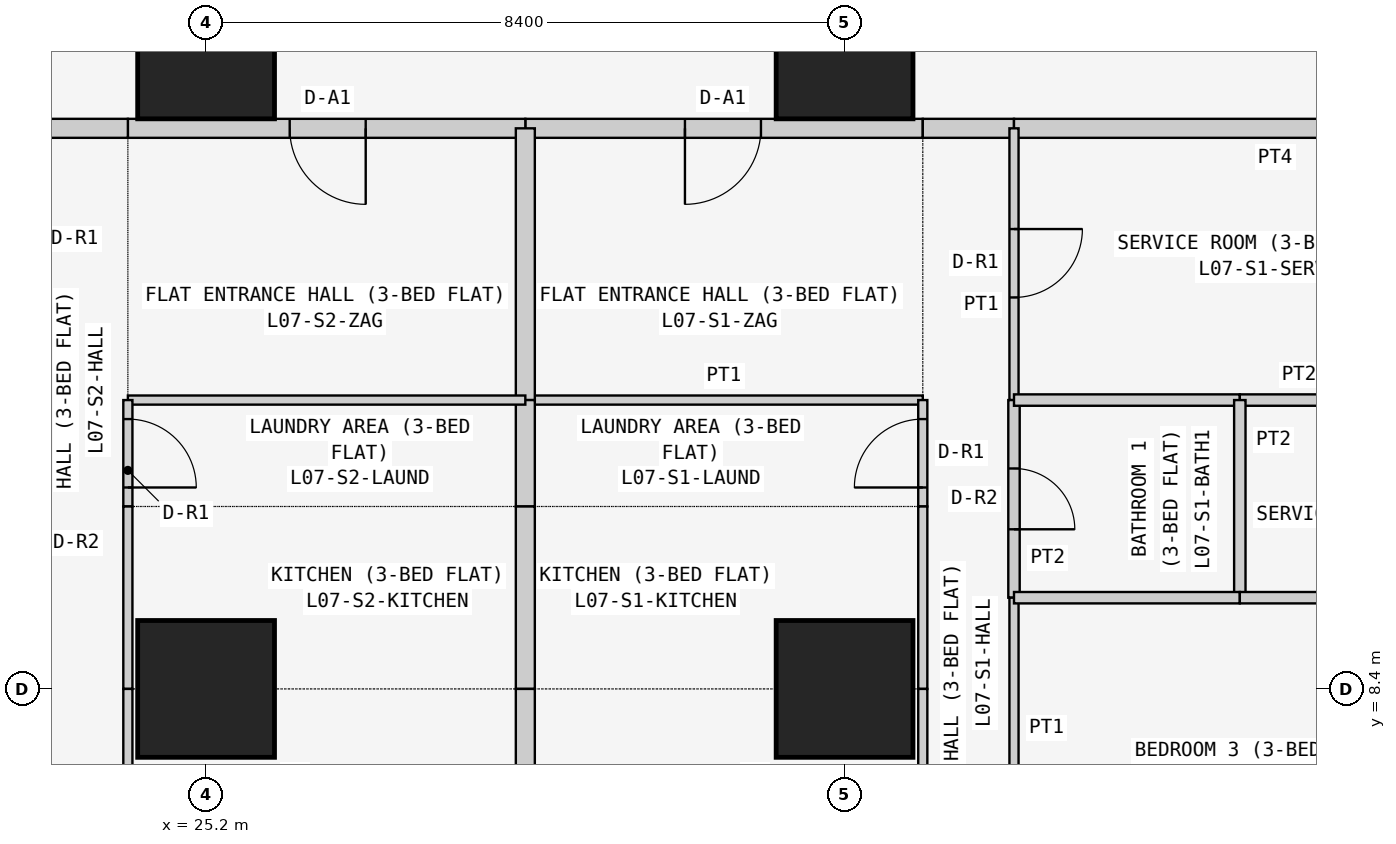
"""IFC4 building model, lengths in metres.
Left out: names, types, materials, properties, quantities, classifications, styles, units other than length and angle.
Written with IfcOpenShell. Run it as: python <this file> out.ifc"""

import sys

from ifc_helpers import new_model, si_unit, direction, frame, frame_2d, origin, origin_2d, place, context, subcontext, project, spatial, rectangle, extrude, element, fill, save


model = new_model("IFC4")
c1 = context("Model", 3, precision=1e-05, world=origin(), true_north=direction((0.0, 1.0)))
c2 = subcontext(c1, "Body", "Model", "MODEL_VIEW")
j1 = project(units=[si_unit("LENGTHUNIT", "METRE"), si_unit("PLANEANGLEUNIT", "RADIAN")], contexts=[c1])
p1 = place(None, origin())
s1 = spatial("IfcSite", under=j1, at=p1, CompositionType="ELEMENT")
p2 = place(p1, origin())
s2 = spatial("IfcBuilding", under=s1, at=p2, CompositionType="ELEMENT")
p3 = place(p2, frame((0.0, 0.0, 34.5)))
s3 = spatial("IfcBuildingStorey", under=s2, at=p3, CompositionType="ELEMENT", Elevation=34.5)
for number, where, z_axis, x_axis in (
    (1, (25.2, 8.4, 0.0), (0.0, 0.0, 1.0), (1.0, 0.0, 0.0)),
    (2, (25.2, 16.8, 0.0), (0.0, 0.0, 1.0), (1.0, 0.0, 0.0)),
    (3, (33.6, 8.4, 0.0), (0.0, 0.0, 1.0), (1.0, 0.0, 0.0)),
    (4, (33.6, 16.8, 0.0), (0.0, 0.0, 1.0), (1.0, 0.0, 0.0)),
):
    element("IfcColumn", number, at=place(p3, frame(where, z_axis=z_axis, x_axis=x_axis)), inside=s3, PredefinedType="COLUMN", context=c2, shape_type="SweptSolid", body=[
        extrude(rectangle(XDim=1.8, YDim=1.8, at=origin_2d()), origin(), (0.0, 0.0, 1.0), 3.6),
    ])
p4 = place(p3, frame((34.629, 15.775, 0.0), z_axis=(0.0, 0.0, 1.0), x_axis=(-1.0, 0.0, 0.0)))
e5 = element("IfcWall", 5, at=p4, inside=s3, PredefinedType="PARTITIONING", context=c2, shape_type="SweptSolid", body=[
    extrude(rectangle(XDim=5.229, YDim=0.25, at=frame_2d((2.615, 0.0))), origin(), (0.0, 0.0, 1.0), 3.45),
])
p5 = place(p4, frame((2.129, 0.0, 0.0)))
e6 = element("IfcOpeningElement", 6, at=p5, cuts=e5, PredefinedType="OPENING", context=c2, shape_type="SweptSolid", body=[
    extrude(rectangle(XDim=1.0, YDim=2.1, at=frame_2d((0.5, 1.05))), frame((0.0, 0.135, 0.0), z_axis=(0.0, -1.0, 0.0), x_axis=(1.0, 0.0, 0.0)), (0.0, 0.0, 1.0), 0.27),
])
p6 = place(p3, frame((35.829, 15.775, 0.0), z_axis=(0.0, 0.0, 1.0), x_axis=(-1.0, 0.0, 0.0)))
e7 = element("IfcWall", 7, at=p6, inside=s3, PredefinedType="PARTITIONING", context=c2, shape_type="SweptSolid", body=[
    extrude(rectangle(XDim=1.2, YDim=0.25, at=frame_2d((0.6, 0.0))), origin(), (0.0, 0.0, 1.0), 3.45),
])
p7 = place(p3, frame((42.7, 15.775, 0.0), z_axis=(0.0, 0.0, 1.0), x_axis=(-1.0, 0.0, 0.0)))
e8 = element("IfcWall", 8, at=p7, inside=s3, PredefinedType="PARTITIONING", context=c2, shape_type="SweptSolid", body=[
    extrude(rectangle(XDim=6.871, YDim=0.25, at=frame_2d((3.436, 0.0))), origin(), (0.0, 0.0, 1.0), 3.45),
])
p8 = place(p3, frame((29.4, 15.775, 0.0), z_axis=(0.0, 0.0, 1.0), x_axis=(-1.0, 0.0, 0.0)))
e9 = element("IfcWall", 9, at=p8, inside=s3, PredefinedType="PARTITIONING", context=c2, shape_type="SweptSolid", body=[
    extrude(rectangle(XDim=5.229, YDim=0.25, at=frame_2d((2.615, 0.0))), origin(), (0.0, 0.0, 1.0), 3.45),
])
p9 = place(p8, frame((2.1, 0.0, 0.0)))
e10 = element("IfcOpeningElement", 10, at=p9, cuts=e9, PredefinedType="OPENING", context=c2, shape_type="SweptSolid", body=[
    extrude(rectangle(XDim=1.0, YDim=2.1, at=frame_2d((0.5, 1.05))), frame((0.0, 0.135, 0.0), z_axis=(0.0, -1.0, 0.0), x_axis=(1.0, 0.0, 0.0)), (0.0, 0.0, 1.0), 0.27),
])
p10 = place(p3, frame((24.171, 15.775, 0.0), z_axis=(0.0, 0.0, 1.0), x_axis=(-1.0, 0.0, 0.0)))
e11 = element("IfcWall", 11, at=p10, inside=s3, PredefinedType="PARTITIONING", context=c2, shape_type="SweptSolid", body=[
    extrude(rectangle(XDim=1.2, YDim=0.25, at=frame_2d((0.6, 0.0))), origin(), (0.0, 0.0, 1.0), 3.45),
])
p11 = place(p3, frame((29.4, 12.2, 0.0), z_axis=(0.0, 0.0, 1.0), x_axis=(1.0, 0.0, 0.0)))
e12 = element("IfcWall", 12, at=p11, inside=s3, PredefinedType="PARTITIONING", context=c2, shape_type="SweptSolid", body=[
    extrude(rectangle(XDim=5.229, YDim=0.12, at=frame_2d((2.615, 0.0))), origin(), (0.0, 0.0, 1.0), 3.45),
])
p12 = place(p3, frame((29.4, 15.775, 0.0), z_axis=(0.0, 0.0, 1.0), x_axis=(0.0, -1.0, 0.0)))
e13 = element("IfcWall", 13, at=p12, inside=s3, PredefinedType="PARTITIONING", context=c2, shape_type="SweptSolid", body=[
    extrude(rectangle(XDim=3.575, YDim=0.25, at=frame_2d((1.788, 0.0))), origin(), (0.0, 0.0, 1.0), 2.848),
])
p13 = place(p3, frame((34.629, 10.8, 0.0), z_axis=(0.0, 0.0, 1.0), x_axis=(0.0, 1.0, 0.0)))
e14 = element("IfcWall", 14, at=p13, inside=s3, PredefinedType="PARTITIONING", context=c2, shape_type="SweptSolid", body=[
    extrude(rectangle(XDim=1.4, YDim=0.12, at=frame_2d((0.7, 0.0))), origin(), (0.0, 0.0, 1.0), 3.45),
])
p14 = place(p13, frame((0.25, 0.0, 0.0)))
e15 = element("IfcOpeningElement", 15, at=p14, cuts=e14, PredefinedType="OPENING", context=c2, shape_type="SweptSolid", body=[
    extrude(rectangle(XDim=0.9, YDim=2.1, at=frame_2d((0.45, 1.05))), frame((0.0, 0.07, 0.0), z_axis=(0.0, -1.0, 0.0), x_axis=(1.0, 0.0, 0.0)), (0.0, 0.0, 1.0), 0.14),
])
p15 = place(p3, frame((29.4, 12.2, 0.0), z_axis=(0.0, 0.0, 1.0), x_axis=(0.0, -1.0, 0.0)))
e16 = element("IfcWall", 16, at=p15, inside=s3, PredefinedType="PARTITIONING", context=c2, shape_type="SweptSolid", body=[
    extrude(rectangle(XDim=1.4, YDim=0.25, at=frame_2d((0.7, 0.0))), origin(), (0.0, 0.0, 1.0), 2.848),
])
p16 = place(p3, frame((34.629, 8.4, 0.0), z_axis=(0.0, 0.0, 1.0), x_axis=(0.0, 1.0, 0.0)))
e17 = element("IfcWall", 17, at=p16, inside=s3, PredefinedType="PARTITIONING", context=c2, shape_type="SweptSolid", body=[
    extrude(rectangle(XDim=2.4, YDim=0.12, at=frame_2d((1.2, 0.0))), origin(), (0.0, 0.0, 1.0), 3.45),
])
p17 = place(p3, frame((29.4, 10.8, 0.0), z_axis=(0.0, 0.0, 1.0), x_axis=(0.0, -1.0, 0.0)))
e18 = element("IfcWall", 18, at=p17, inside=s3, PredefinedType="PARTITIONING", context=c2, shape_type="SweptSolid", body=[
    extrude(rectangle(XDim=2.4, YDim=0.25, at=frame_2d((1.2, 0.0))), origin(), (0.0, 0.0, 1.0), 2.848),
])
p18 = place(p3, frame((34.629, 3.5, 0.0), z_axis=(0.0, 0.0, 1.0), x_axis=(0.0, 1.0, 0.0)))
e19 = element("IfcWall", 19, at=p18, inside=s3, PredefinedType="PARTITIONING", context=c2, shape_type="SweptSolid", body=[
    extrude(rectangle(XDim=4.9, YDim=0.12, at=frame_2d((2.45, 0.0))), origin(), (0.0, 0.0, 1.0), 3.45),
])
p19 = place(p18, frame((1.25, 0.0, 0.0)))
e20 = element("IfcOpeningElement", 20, at=p19, cuts=e19, PredefinedType="OPENING", context=c2, shape_type="SweptSolid", body=[
    extrude(rectangle(XDim=0.9, YDim=2.1, at=frame_2d((0.45, 1.05))), frame((0.0, 0.07, 0.0), z_axis=(0.0, -1.0, 0.0), x_axis=(1.0, 0.0, 0.0)), (0.0, 0.0, 1.0), 0.14),
])
p20 = place(p3, frame((29.4, 8.4, 0.0), z_axis=(0.0, 0.0, 1.0), x_axis=(0.0, -1.0, 0.0)))
e21 = element("IfcWall", 21, at=p20, inside=s3, PredefinedType="PARTITIONING", context=c2, shape_type="SweptSolid", body=[
    extrude(rectangle(XDim=9.05, YDim=0.25, at=frame_2d((4.525, 0.0))), origin(), (0.0, 0.0, 1.0), 2.848),
])
p21 = place(p3, frame((35.829, 12.2, 0.0), z_axis=(0.0, 0.0, 1.0), x_axis=(0.0, 1.0, 0.0)))
e22 = element("IfcWall", 22, at=p21, inside=s3, PredefinedType="PARTITIONING", context=c2, shape_type="SweptSolid", body=[
    extrude(rectangle(XDim=3.575, YDim=0.12, at=frame_2d((1.788, 0.0))), origin(), (0.0, 0.0, 1.0), 3.45),
])
p22 = place(p21, frame((1.35, 0.0, 0.0)))
e23 = element("IfcOpeningElement", 23, at=p22, cuts=e22, PredefinedType="OPENING", context=c2, shape_type="SweptSolid", body=[
    extrude(rectangle(XDim=0.9, YDim=2.1, at=frame_2d((0.45, 1.05))), frame((0.0, 0.07, 0.0), z_axis=(0.0, -1.0, 0.0), x_axis=(1.0, 0.0, 0.0)), (0.0, 0.0, 1.0), 0.14),
])
p23 = place(p3, frame((35.829, 9.6, 0.0), z_axis=(0.0, 0.0, 1.0), x_axis=(0.0, 1.0, 0.0)))
e24 = element("IfcWall", 24, at=p23, inside=s3, PredefinedType="PARTITIONING", context=c2, shape_type="SweptSolid", body=[
    extrude(rectangle(XDim=2.6, YDim=0.15, at=frame_2d((1.3, 0.0))), origin(), (0.0, 0.0, 1.0), 3.45),
])
p24 = place(p23, frame((0.9, 0.0, 0.0)))
e25 = element("IfcOpeningElement", 25, at=p24, cuts=e24, PredefinedType="OPENING", context=c2, shape_type="SweptSolid", body=[
    extrude(rectangle(XDim=0.8, YDim=2.1, at=frame_2d((0.4, 1.05))), frame((0.0, 0.085, 0.0), z_axis=(0.0, -1.0, 0.0), x_axis=(1.0, 0.0, 0.0)), (0.0, 0.0, 1.0), 0.17),
])
p25 = place(p3, frame((35.829, 4.7, 0.0), z_axis=(0.0, 0.0, 1.0), x_axis=(0.0, 1.0, 0.0)))
e26 = element("IfcWall", 26, at=p25, inside=s3, PredefinedType="PARTITIONING", context=c2, shape_type="SweptSolid", body=[
    extrude(rectangle(XDim=4.9, YDim=0.12, at=frame_2d((2.45, 0.0))), origin(), (0.0, 0.0, 1.0), 3.45),
])
p26 = place(p25, frame((1.65, 0.0, 0.0)))
e27 = element("IfcOpeningElement", 27, at=p26, cuts=e26, PredefinedType="OPENING", context=c2, shape_type="SweptSolid", body=[
    extrude(rectangle(XDim=0.9, YDim=2.1, at=frame_2d((0.45, 1.05))), frame((0.0, 0.07, 0.0), z_axis=(0.0, -1.0, 0.0), x_axis=(1.0, 0.0, 0.0)), (0.0, 0.0, 1.0), 0.14),
])
p27 = place(p3, frame((35.829, 12.2, 0.0), z_axis=(0.0, 0.0, 1.0), x_axis=(1.0, 0.0, 0.0)))
e28 = element("IfcWall", 28, at=p27, inside=s3, PredefinedType="PARTITIONING", context=c2, shape_type="SweptSolid", body=[
    extrude(rectangle(XDim=2.971, YDim=0.15, at=frame_2d((1.485, 0.0))), origin(), (0.0, 0.0, 1.0), 3.45),
])
p28 = place(p3, frame((38.8, 12.2, 0.0), z_axis=(0.0, 0.0, 1.0), x_axis=(1.0, 0.0, 0.0)))
e29 = element("IfcWall", 29, at=p28, inside=s3, PredefinedType="PARTITIONING", context=c2, shape_type="SweptSolid", body=[
    extrude(rectangle(XDim=3.9, YDim=0.15, at=frame_2d((1.95, 0.0))), origin(), (0.0, 0.0, 1.0), 3.45),
])
p29 = place(p28, frame((1.55, 0.0, 0.0)))
e30 = element("IfcOpeningElement", 30, at=p29, cuts=e29, PredefinedType="OPENING", context=c2, shape_type="SweptSolid", body=[
    extrude(rectangle(XDim=0.8, YDim=2.1, at=frame_2d((0.4, 1.05))), frame((0.0, 0.085, 0.0), z_axis=(0.0, -1.0, 0.0), x_axis=(1.0, 0.0, 0.0)), (0.0, 0.0, 1.0), 0.17),
])
p30 = place(p3, frame((38.8, 9.6, 0.0), z_axis=(0.0, 0.0, 1.0), x_axis=(0.0, 1.0, 0.0)))
e31 = element("IfcWall", 31, at=p30, inside=s3, PredefinedType="PARTITIONING", context=c2, shape_type="SweptSolid", body=[
    extrude(rectangle(XDim=2.6, YDim=0.15, at=frame_2d((1.3, 0.0))), origin(), (0.0, 0.0, 1.0), 3.45),
])
p31 = place(p3, frame((35.829, 9.6, 0.0), z_axis=(0.0, 0.0, 1.0), x_axis=(1.0, 0.0, 0.0)))
e32 = element("IfcWall", 32, at=p31, inside=s3, PredefinedType="PARTITIONING", context=c2, shape_type="SweptSolid", body=[
    extrude(rectangle(XDim=2.971, YDim=0.15, at=frame_2d((1.485, 0.0))), origin(), (0.0, 0.0, 1.0), 3.45),
])
p32 = place(p3, frame((38.8, 9.6, 0.0), z_axis=(0.0, 0.0, 1.0), x_axis=(1.0, 0.0, 0.0)))
e33 = element("IfcWall", 33, at=p32, inside=s3, PredefinedType="PARTITIONING", context=c2, shape_type="SweptSolid", body=[
    extrude(rectangle(XDim=3.9, YDim=0.15, at=frame_2d((1.95, 0.0))), origin(), (0.0, 0.0, 1.0), 3.45),
])
p33 = place(p3, frame((29.4, 12.2, 0.0), z_axis=(0.0, 0.0, 1.0), x_axis=(-1.0, 0.0, 0.0)))
e34 = element("IfcWall", 34, at=p33, inside=s3, PredefinedType="PARTITIONING", context=c2, shape_type="SweptSolid", body=[
    extrude(rectangle(XDim=5.229, YDim=0.12, at=frame_2d((2.615, 0.0))), origin(), (0.0, 0.0, 1.0), 3.45),
])
p34 = place(p3, frame((24.171, 10.8, 0.0), z_axis=(0.0, 0.0, 1.0), x_axis=(0.0, 1.0, 0.0)))
e35 = element("IfcWall", 35, at=p34, inside=s3, PredefinedType="PARTITIONING", context=c2, shape_type="SweptSolid", body=[
    extrude(rectangle(XDim=1.4, YDim=0.12, at=frame_2d((0.7, 0.0))), origin(), (0.0, 0.0, 1.0), 3.45),
])
p35 = place(p34, frame((0.25, 0.0, 0.0)))
e36 = element("IfcOpeningElement", 36, at=p35, cuts=e35, PredefinedType="OPENING", context=c2, shape_type="SweptSolid", body=[
    extrude(rectangle(XDim=0.9, YDim=2.1, at=frame_2d((0.45, 1.05))), frame((0.0, 0.07, 0.0), z_axis=(0.0, -1.0, 0.0), x_axis=(1.0, 0.0, 0.0)), (0.0, 0.0, 1.0), 0.14),
])
p36 = place(p3, frame((24.171, 8.4, 0.0), z_axis=(0.0, 0.0, 1.0), x_axis=(0.0, 1.0, 0.0)))
e37 = element("IfcWall", 37, at=p36, inside=s3, PredefinedType="PARTITIONING", context=c2, shape_type="SweptSolid", body=[
    extrude(rectangle(XDim=2.4, YDim=0.12, at=frame_2d((1.2, 0.0))), origin(), (0.0, 0.0, 1.0), 3.45),
])
p37 = place(p3, frame((24.171, 3.5, 0.0), z_axis=(0.0, 0.0, 1.0), x_axis=(0.0, 1.0, 0.0)))
e38 = element("IfcWall", 38, at=p37, inside=s3, PredefinedType="PARTITIONING", context=c2, shape_type="SweptSolid", body=[
    extrude(rectangle(XDim=4.9, YDim=0.12, at=frame_2d((2.45, 0.0))), origin(), (0.0, 0.0, 1.0), 3.45),
])
p38 = place(p37, frame((1.25, 0.0, 0.0)))
e39 = element("IfcOpeningElement", 39, at=p38, cuts=e38, PredefinedType="OPENING", context=c2, shape_type="SweptSolid", body=[
    extrude(rectangle(XDim=0.9, YDim=2.1, at=frame_2d((0.45, 1.05))), frame((0.0, 0.07, 0.0), z_axis=(0.0, -1.0, 0.0), x_axis=(1.0, 0.0, 0.0)), (0.0, 0.0, 1.0), 0.14),
])
p39 = place(p5, origin())
e40 = element("IfcDoor", 40, at=p39, inside=s3, OperationType="SINGLE_SWING_RIGHT", PredefinedType="DOOR", context=c2, shape_type="SweptSolid", body=[
    extrude(rectangle(XDim=1.0, YDim=2.1, at=frame_2d((0.5, 1.05))), frame((0.0, 0.025, 0.0), z_axis=(0.0, -1.0, 0.0), x_axis=(1.0, 0.0, 0.0)), (0.0, 0.0, 1.0), 0.05),
])
fill(e6, e40)
p40 = place(p14, origin())
e41 = element("IfcDoor", 41, at=p40, inside=s3, OperationType="SINGLE_SWING_LEFT", PredefinedType="DOOR", context=c2, shape_type="SweptSolid", body=[
    extrude(rectangle(XDim=0.9, YDim=2.1, at=frame_2d((0.45, 1.05))), frame((0.0, 0.025, 0.0), z_axis=(0.0, -1.0, 0.0), x_axis=(1.0, 0.0, 0.0)), (0.0, 0.0, 1.0), 0.05),
])
fill(e15, e41)
p41 = place(p22, frame((0.9, 0.0, 0.0), z_axis=(0.0, 0.0, 1.0), x_axis=(-1.0, 0.0, 0.0)))
e42 = element("IfcDoor", 42, at=p41, inside=s3, OperationType="SINGLE_SWING_LEFT", PredefinedType="DOOR", context=c2, shape_type="SweptSolid", body=[
    extrude(rectangle(XDim=0.9, YDim=2.1, at=frame_2d((0.45, 1.05))), frame((0.0, 0.025, 0.0), z_axis=(0.0, -1.0, 0.0), x_axis=(1.0, 0.0, 0.0)), (0.0, 0.0, 1.0), 0.05),
])
fill(e23, e42)
p42 = place(p24, frame((0.8, 0.0, 0.0), z_axis=(0.0, 0.0, 1.0), x_axis=(-1.0, 0.0, 0.0)))
e43 = element("IfcDoor", 43, at=p42, inside=s3, OperationType="SINGLE_SWING_RIGHT", PredefinedType="DOOR", context=c2, shape_type="SweptSolid", body=[
    extrude(rectangle(XDim=0.8, YDim=2.1, at=frame_2d((0.4, 1.05))), frame((0.0, 0.025, 0.0), z_axis=(0.0, -1.0, 0.0), x_axis=(1.0, 0.0, 0.0)), (0.0, 0.0, 1.0), 0.05),
])
fill(e25, e43)
p43 = place(p9, origin())
e44 = element("IfcDoor", 44, at=p43, inside=s3, OperationType="SINGLE_SWING_LEFT", PredefinedType="DOOR", context=c2, shape_type="SweptSolid", body=[
    extrude(rectangle(XDim=1.0, YDim=2.1, at=frame_2d((0.5, 1.05))), frame((0.0, 0.025, 0.0), z_axis=(0.0, -1.0, 0.0), x_axis=(1.0, 0.0, 0.0)), (0.0, 0.0, 1.0), 0.05),
])
fill(e10, e44)
p44 = place(p35, frame((0.9, 0.0, 0.0), z_axis=(0.0, 0.0, 1.0), x_axis=(-1.0, 0.0, 0.0)))
e45 = element("IfcDoor", 45, at=p44, inside=s3, OperationType="SINGLE_SWING_RIGHT", PredefinedType="DOOR", context=c2, shape_type="SweptSolid", body=[
    extrude(rectangle(XDim=0.9, YDim=2.1, at=frame_2d((0.45, 1.05))), frame((0.0, 0.025, 0.0), z_axis=(0.0, -1.0, 0.0), x_axis=(1.0, 0.0, 0.0)), (0.0, 0.0, 1.0), 0.05),
])
fill(e36, e45)
save(model, sys.argv[1])
